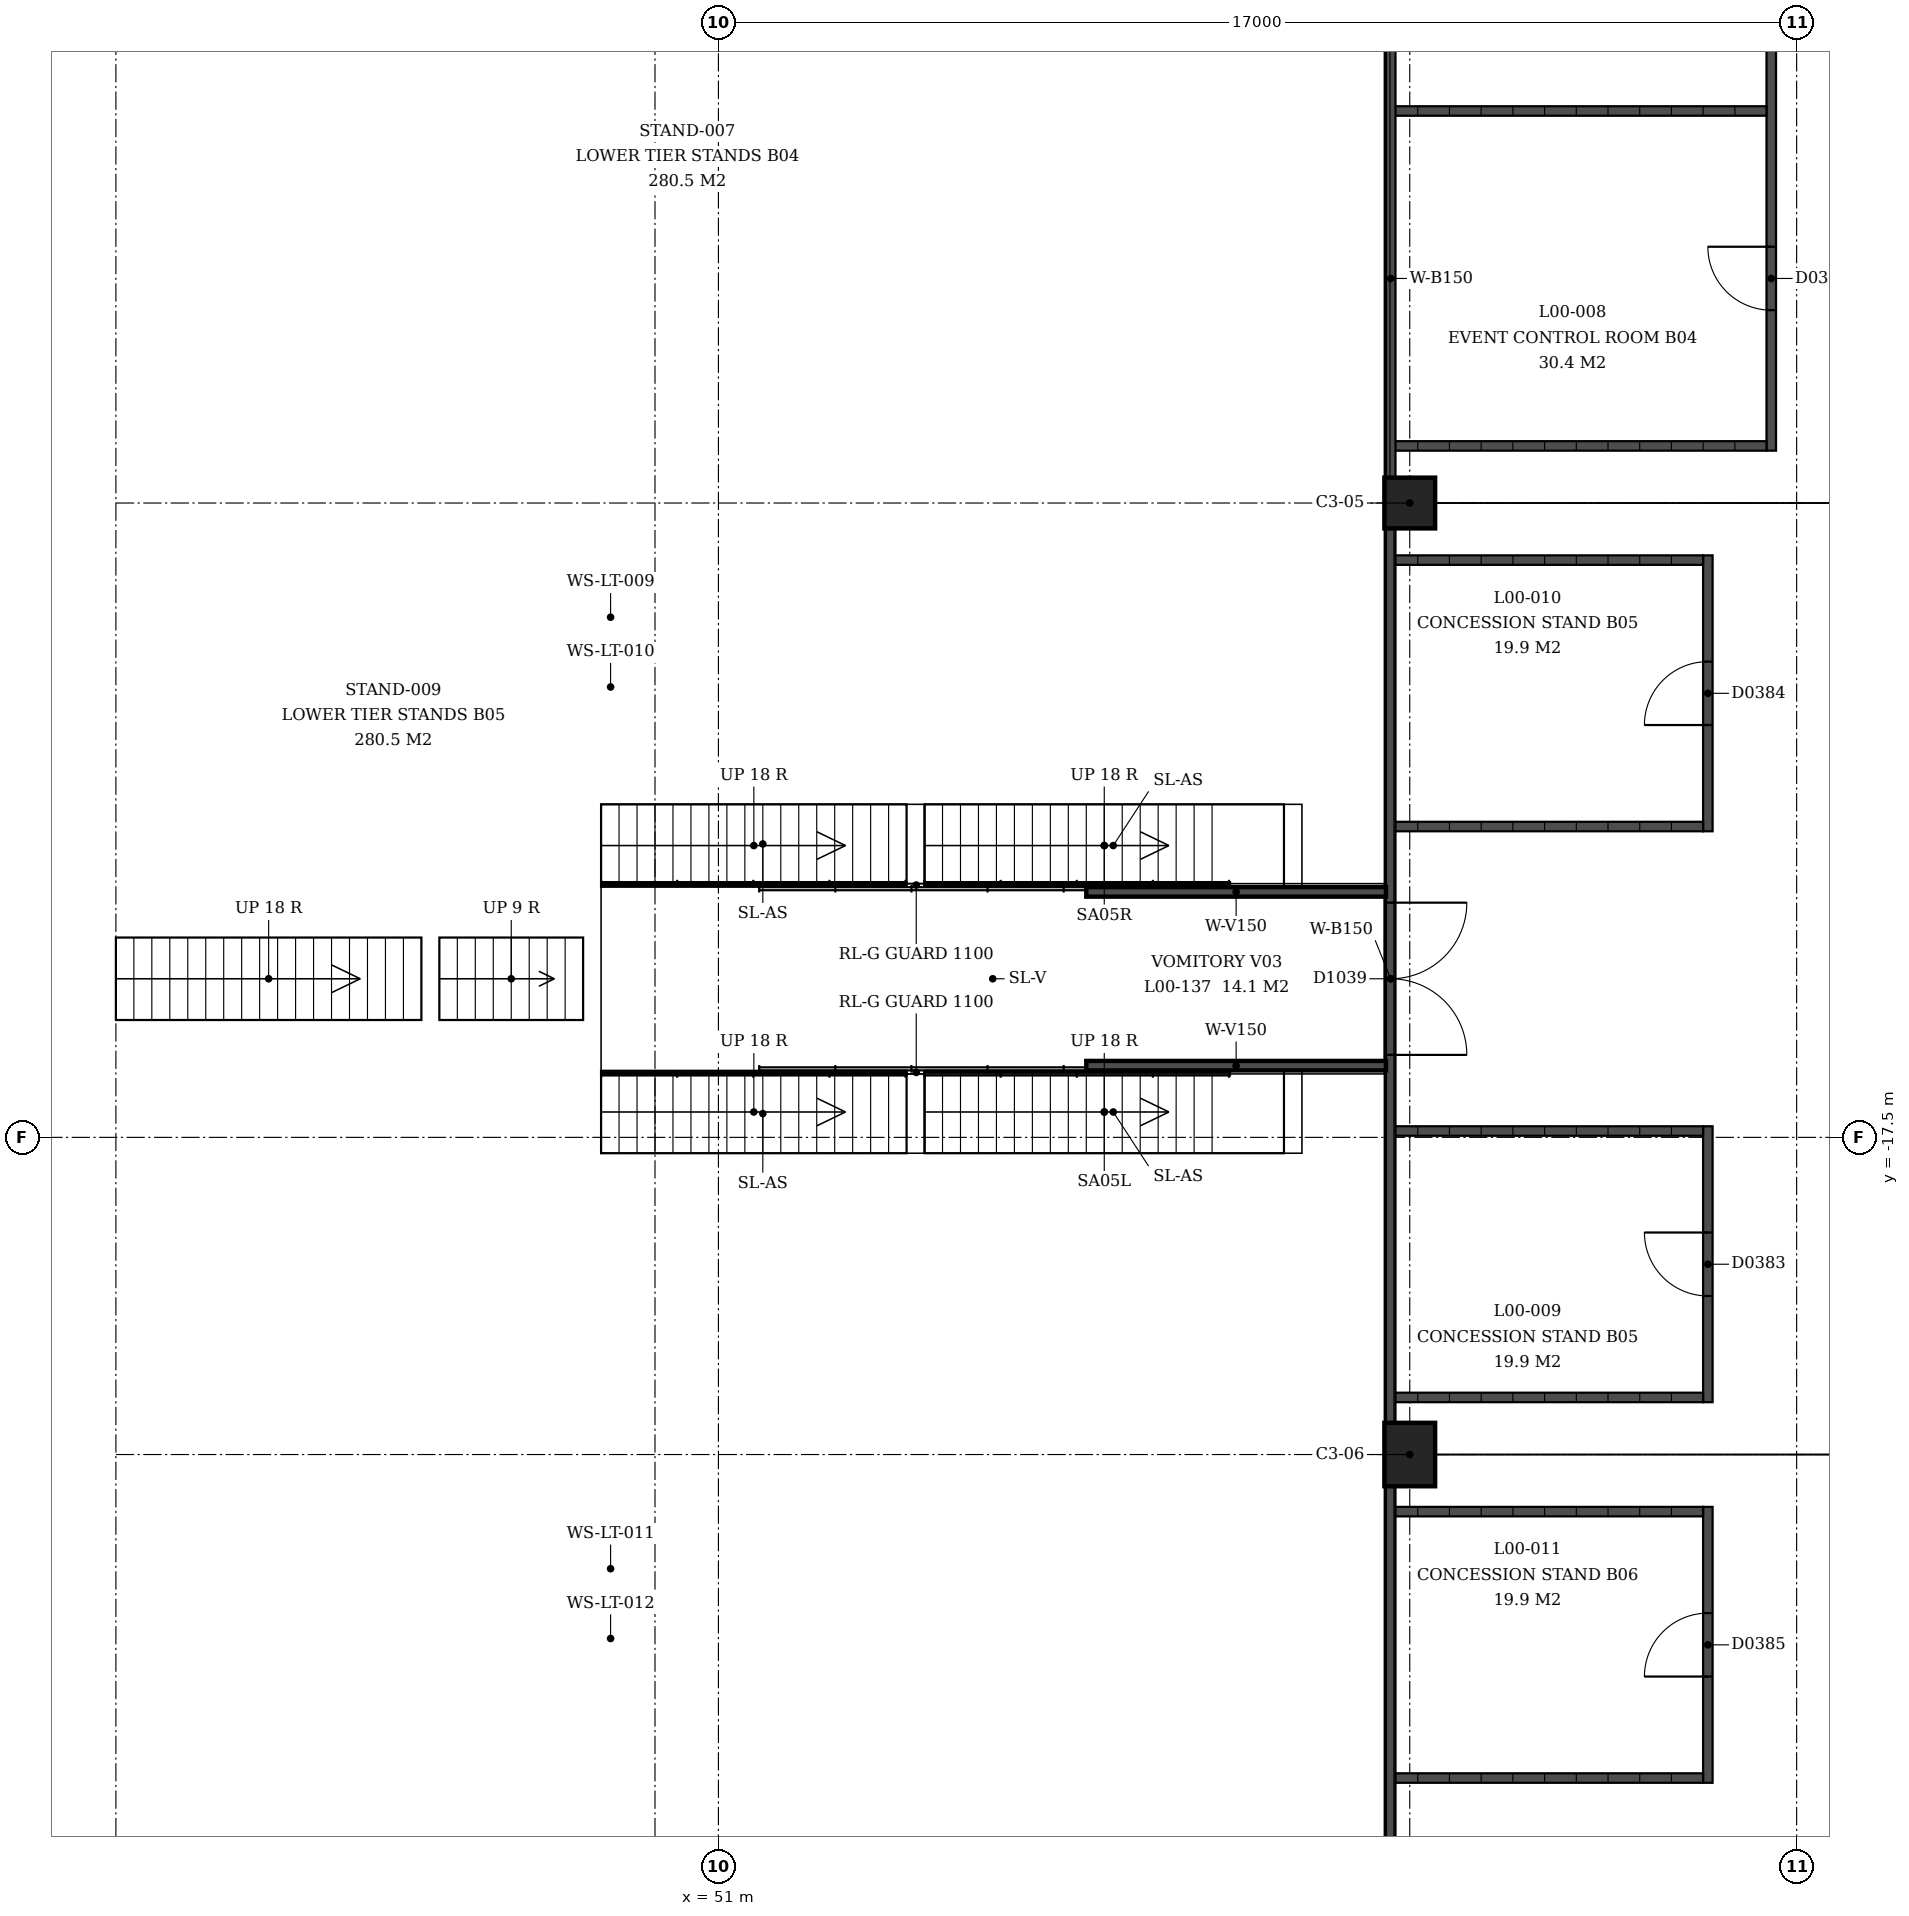
"""IFC4 building model, lengths in metres.
Left out: names, types, materials, properties, quantities, classifications, styles, units other than length and angle.
Written with IfcOpenShell. Run it as: python <this file> out.ifc"""

import sys

from ifc_helpers import new_model, si_unit, direction, frame, frame_2d, origin, origin_2d, place, context, subcontext, project, spatial, rectangle, extrude, element, fill, save


model = new_model("IFC4")
c1 = context("Model", 3, precision=1e-05, world=origin(), true_north=direction((0.0, 1.0)))
c2 = subcontext(c1, "Body", "Model", "MODEL_VIEW")
j1 = project(units=[si_unit("LENGTHUNIT", "METRE"), si_unit("PLANEANGLEUNIT", "RADIAN")], contexts=[c1])
p1 = place(None, origin())
s1 = spatial("IfcSite", under=j1, at=p1, CompositionType="ELEMENT")
p2 = place(p1, origin())
s2 = spatial("IfcBuilding", under=s1, at=p2, CompositionType="ELEMENT")
p3 = place(p2, origin())
s3 = spatial("IfcBuildingStorey", under=s2, at=p3, CompositionType="ELEMENT", Elevation=0.0)
p4 = place(p3, frame((61.9, -7.5, 0.0), z_axis=(0.0, 0.0, 1.0), x_axis=(0.0, 1.0, 0.0)))
e1 = element("IfcColumn", 1, at=p4, inside=s3, PredefinedType="COLUMN", context=c2, shape_type="SweptSolid", body=[
    extrude(rectangle(XDim=0.8, YDim=0.8, at=origin_2d()), origin(), (0.0, 0.0, 1.0), 4.5),
])
p5 = place(p3, frame((61.9, -22.5, 0.0), z_axis=(0.0, 0.0, 1.0), x_axis=(0.0, 1.0, 0.0)))
e2 = element("IfcColumn", 2, at=p5, inside=s3, PredefinedType="COLUMN", context=c2, shape_type="SweptSolid", body=[
    extrude(rectangle(XDim=1.0, YDim=0.8, at=origin_2d()), origin(), (0.0, 0.0, 1.0), 4.5),
])
p6 = place(p3, frame((67.6, 6.675, 0.0), z_axis=(0.0, 0.0, 1.0), x_axis=(0.0, -1.0, 0.0)))
e3 = element("IfcWall", 3, at=p6, inside=s3, PredefinedType="SOLIDWALL", context=c2, shape_type="SweptSolid", body=[
    extrude(rectangle(XDim=13.35, YDim=0.15, at=frame_2d((6.675, 0.0))), origin(), (0.0, 0.0, 1.0), 3.0),
])
p7 = place(p6, frame((3.535, 0.0, 0.0)))
e4 = element("IfcOpeningElement", 4, at=p7, cuts=e3, PredefinedType="OPENING", context=c2, shape_type="SweptSolid", body=[
    extrude(rectangle(XDim=1.0, YDim=2.1, at=frame_2d((0.5, 1.05))), frame((0.0, 0.075, 0.0), z_axis=(0.0, -1.0, 0.0), x_axis=(1.0, 0.0, 0.0)), (0.0, 0.0, 1.0), 0.15),
])
p8 = place(p6, frame((10.135, 0.0, 0.0)))
e5 = element("IfcOpeningElement", 5, at=p8, cuts=e3, PredefinedType="OPENING", context=c2, shape_type="SweptSolid", body=[
    extrude(rectangle(XDim=1.0, YDim=2.1, at=frame_2d((0.5, 1.05))), frame((0.0, 0.075, 0.0), z_axis=(0.0, -1.0, 0.0), x_axis=(1.0, 0.0, 0.0)), (0.0, 0.0, 1.0), 0.15),
])
for number, where, z_axis, x_axis in (
    (6, (61.6, -1.32, 0.0), (0.0, 0.0, 1.0), (1.0, 0.0, 0.0)),
    (7, (61.6, -6.6, 0.0), (0.0, 0.0, 1.0), (1.0, 0.0, 0.0)),
):
    element("IfcWall", number, at=place(p3, frame(where, z_axis=z_axis, x_axis=x_axis)), inside=s3, PredefinedType="SOLIDWALL", context=c2, shape_type="SweptSolid", body=[
        extrude(rectangle(XDim=5.925, YDim=0.15, at=frame_2d((2.962, 0.0))), origin(), (0.0, 0.0, 1.0), 3.0),
    ])
p9 = place(p3, frame((66.6, -21.675, 0.0), z_axis=(0.0, 0.0, 1.0), x_axis=(0.0, 1.0, 0.0)))
e8 = element("IfcWall", 8, at=p9, inside=s3, PredefinedType="SOLIDWALL", context=c2, shape_type="SweptSolid", body=[
    extrude(rectangle(XDim=4.35, YDim=0.15, at=frame_2d((2.175, 0.0))), origin(), (0.0, 0.0, 1.0), 3.0),
])
p10 = place(p9, frame((1.675, 0.0, 0.0)))
e9 = element("IfcOpeningElement", 9, at=p10, cuts=e8, PredefinedType="OPENING", context=c2, shape_type="SweptSolid", body=[
    extrude(rectangle(XDim=1.0, YDim=2.1, at=frame_2d((0.5, 1.05))), frame((0.0, 0.075, 0.0), z_axis=(0.0, -1.0, 0.0), x_axis=(1.0, 0.0, 0.0)), (0.0, 0.0, 1.0), 0.15),
])
for number, where, z_axis, x_axis in (
    (10, (61.6, -21.6, 0.0), (0.0, 0.0, 1.0), (1.0, 0.0, 0.0)),
    (11, (61.6, -17.4, 0.0), (0.0, 0.0, 1.0), (1.0, 0.0, 0.0)),
):
    element("IfcWall", number, at=place(p3, frame(where, z_axis=z_axis, x_axis=x_axis)), inside=s3, PredefinedType="SOLIDWALL", context=c2, shape_type="SweptSolid", body=[
        extrude(rectangle(XDim=4.925, YDim=0.15, at=frame_2d((2.462, 0.0))), origin(), (0.0, 0.0, 1.0), 3.0),
    ])
p11 = place(p3, frame((66.6, -12.675, 0.0), z_axis=(0.0, 0.0, 1.0), x_axis=(0.0, 1.0, 0.0)))
e12 = element("IfcWall", 12, at=p11, inside=s3, PredefinedType="SOLIDWALL", context=c2, shape_type="SweptSolid", body=[
    extrude(rectangle(XDim=4.35, YDim=0.15, at=frame_2d((2.175, 0.0))), origin(), (0.0, 0.0, 1.0), 3.0),
])
p12 = place(p11, frame((1.675, 0.0, 0.0)))
e13 = element("IfcOpeningElement", 13, at=p12, cuts=e12, PredefinedType="OPENING", context=c2, shape_type="SweptSolid", body=[
    extrude(rectangle(XDim=1.0, YDim=2.1, at=frame_2d((0.5, 1.05))), frame((0.0, 0.075, 0.0), z_axis=(0.0, -1.0, 0.0), x_axis=(1.0, 0.0, 0.0)), (0.0, 0.0, 1.0), 0.15),
])
for number, where, z_axis, x_axis in (
    (14, (61.6, -12.6, 0.0), (0.0, 0.0, 1.0), (1.0, 0.0, 0.0)),
    (15, (61.6, -8.4, 0.0), (0.0, 0.0, 1.0), (1.0, 0.0, 0.0)),
):
    element("IfcWall", number, at=place(p3, frame(where, z_axis=z_axis, x_axis=x_axis)), inside=s3, PredefinedType="SOLIDWALL", context=c2, shape_type="SweptSolid", body=[
        extrude(rectangle(XDim=4.925, YDim=0.15, at=frame_2d((2.462, 0.0))), origin(), (0.0, 0.0, 1.0), 3.0),
    ])
p13 = place(p3, frame((66.6, -23.325, 0.0), z_axis=(0.0, 0.0, 1.0), x_axis=(0.0, -1.0, 0.0)))
e16 = element("IfcWall", 16, at=p13, inside=s3, PredefinedType="SOLIDWALL", context=c2, shape_type="SweptSolid", body=[
    extrude(rectangle(XDim=4.35, YDim=0.15, at=frame_2d((2.175, 0.0))), origin(), (0.0, 0.0, 1.0), 3.0),
])
p14 = place(p13, frame((1.675, 0.0, 0.0)))
e17 = element("IfcOpeningElement", 17, at=p14, cuts=e16, PredefinedType="OPENING", context=c2, shape_type="SweptSolid", body=[
    extrude(rectangle(XDim=1.0, YDim=2.1, at=frame_2d((0.5, 1.05))), frame((0.0, 0.075, 0.0), z_axis=(0.0, -1.0, 0.0), x_axis=(1.0, 0.0, 0.0)), (0.0, 0.0, 1.0), 0.15),
])
for number, where, z_axis, x_axis in (
    (18, (61.6, -23.4, 0.0), (0.0, 0.0, 1.0), (1.0, 0.0, 0.0)),
    (19, (61.6, -27.6, 0.0), (0.0, 0.0, 1.0), (1.0, 0.0, 0.0)),
):
    element("IfcWall", number, at=place(p3, frame(where, z_axis=z_axis, x_axis=x_axis)), inside=s3, PredefinedType="SOLIDWALL", context=c2, shape_type="SweptSolid", body=[
        extrude(rectangle(XDim=4.925, YDim=0.15, at=frame_2d((2.462, 0.0))), origin(), (0.0, 0.0, 1.0), 3.0),
    ])
p15 = place(p3, frame((61.6, 7.0, 0.0), z_axis=(0.0, 0.0, 1.0), x_axis=(0.0, -1.0, 0.0)))
e20 = element("IfcWall", 20, at=p15, inside=s3, PredefinedType="SOLIDWALL", context=c2, shape_type="SweptSolid", body=[
    extrude(rectangle(XDim=14.1, YDim=0.15, at=frame_2d((7.05, 0.0))), origin(), (0.0, 0.0, 1.0), 3.0),
])
p16 = place(p3, frame((61.6, -7.9, 0.0), z_axis=(0.0, 0.0, 1.0), x_axis=(0.0, -1.0, 0.0)))
e21 = element("IfcWall", 21, at=p16, inside=s3, PredefinedType="SOLIDWALL", context=c2, shape_type="SweptSolid", body=[
    extrude(rectangle(XDim=14.1, YDim=0.15, at=frame_2d((7.05, 0.0))), origin(), (0.0, 0.0, 1.0), 3.0),
])
p17 = place(p16, frame((5.9, 0.0, 0.0)))
e22 = element("IfcOpeningElement", 22, at=p17, cuts=e21, PredefinedType="OPENING", context=c2, shape_type="SweptSolid", body=[
    extrude(rectangle(XDim=2.4, YDim=2.4, at=frame_2d((1.2, 1.2))), frame((0.0, 0.075, 0.0), z_axis=(0.0, -1.0, 0.0), x_axis=(1.0, 0.0, 0.0)), (0.0, 0.0, 1.0), 0.15),
])
p18 = place(p3, frame((61.6, -23.0, 0.0), z_axis=(0.0, 0.0, 1.0), x_axis=(0.0, -1.0, 0.0)))
e23 = element("IfcWall", 23, at=p18, inside=s3, PredefinedType="SOLIDWALL", context=c2, shape_type="SweptSolid", body=[
    extrude(rectangle(XDim=14.1, YDim=0.15, at=frame_2d((7.05, 0.0))), origin(), (0.0, 0.0, 1.0), 3.0),
])
for number, where, z_axis, x_axis in (
    (24, (56.8, -16.37, 0.0), (0.0, 0.0, 1.0), (1.0, 0.0, 0.0)),
    (25, (56.8, -13.63, 0.0), (0.0, 0.0, 1.0), (1.0, 0.0, 0.0)),
):
    element("IfcWall", number, at=place(p3, frame(where, z_axis=z_axis, x_axis=x_axis)), inside=s3, PredefinedType="SOLIDWALL", context=c2, shape_type="SweptSolid", body=[
        extrude(rectangle(XDim=4.725, YDim=0.15, at=frame_2d((2.362, 0.0))), origin(), (0.0, 0.0, 1.0), 2.75),
    ])
p19 = place(p8, origin())
e26 = element("IfcDoor", 26, at=p19, inside=s3, OperationType="SINGLE_SWING_LEFT", PredefinedType="DOOR", context=c2, shape_type="SweptSolid", body=[
    extrude(rectangle(XDim=1.0, YDim=2.1, at=frame_2d((0.5, 1.05))), frame((0.0, 0.025, 0.0), z_axis=(0.0, -1.0, 0.0), x_axis=(1.0, 0.0, 0.0)), (0.0, 0.0, 1.0), 0.05),
])
fill(e5, e26)
p20 = place(p10, origin())
e27 = element("IfcDoor", 27, at=p20, inside=s3, OperationType="SINGLE_SWING_LEFT", PredefinedType="DOOR", context=c2, shape_type="SweptSolid", body=[
    extrude(rectangle(XDim=1.0, YDim=2.1, at=frame_2d((0.5, 1.05))), frame((0.0, 0.025, 0.0), z_axis=(0.0, -1.0, 0.0), x_axis=(1.0, 0.0, 0.0)), (0.0, 0.0, 1.0), 0.05),
])
fill(e9, e27)
p21 = place(p12, origin())
e28 = element("IfcDoor", 28, at=p21, inside=s3, OperationType="SINGLE_SWING_RIGHT", PredefinedType="DOOR", context=c2, shape_type="SweptSolid", body=[
    extrude(rectangle(XDim=1.0, YDim=2.1, at=frame_2d((0.5, 1.05))), frame((0.0, 0.025, 0.0), z_axis=(0.0, -1.0, 0.0), x_axis=(1.0, 0.0, 0.0)), (0.0, 0.0, 1.0), 0.05),
])
fill(e13, e28)
p22 = place(p14, origin())
e29 = element("IfcDoor", 29, at=p22, inside=s3, OperationType="SINGLE_SWING_RIGHT", PredefinedType="DOOR", context=c2, shape_type="SweptSolid", body=[
    extrude(rectangle(XDim=1.0, YDim=2.1, at=frame_2d((0.5, 1.05))), frame((0.0, 0.025, 0.0), z_axis=(0.0, -1.0, 0.0), x_axis=(1.0, 0.0, 0.0)), (0.0, 0.0, 1.0), 0.05),
])
fill(e17, e29)
p23 = place(p17, origin())
e30 = element("IfcDoor", 30, at=p23, inside=s3, OperationType="DOUBLE_DOOR_SINGLE_SWING", PredefinedType="DOOR", context=c2, shape_type="SweptSolid", body=[
    extrude(rectangle(XDim=2.4, YDim=2.4, at=frame_2d((1.2, 1.2))), frame((0.0, 0.025, 0.0), z_axis=(0.0, -1.0, 0.0), x_axis=(1.0, 0.0, 0.0)), (0.0, 0.0, 1.0), 0.05),
])
fill(e22, e30)
save(model, sys.argv[1])
